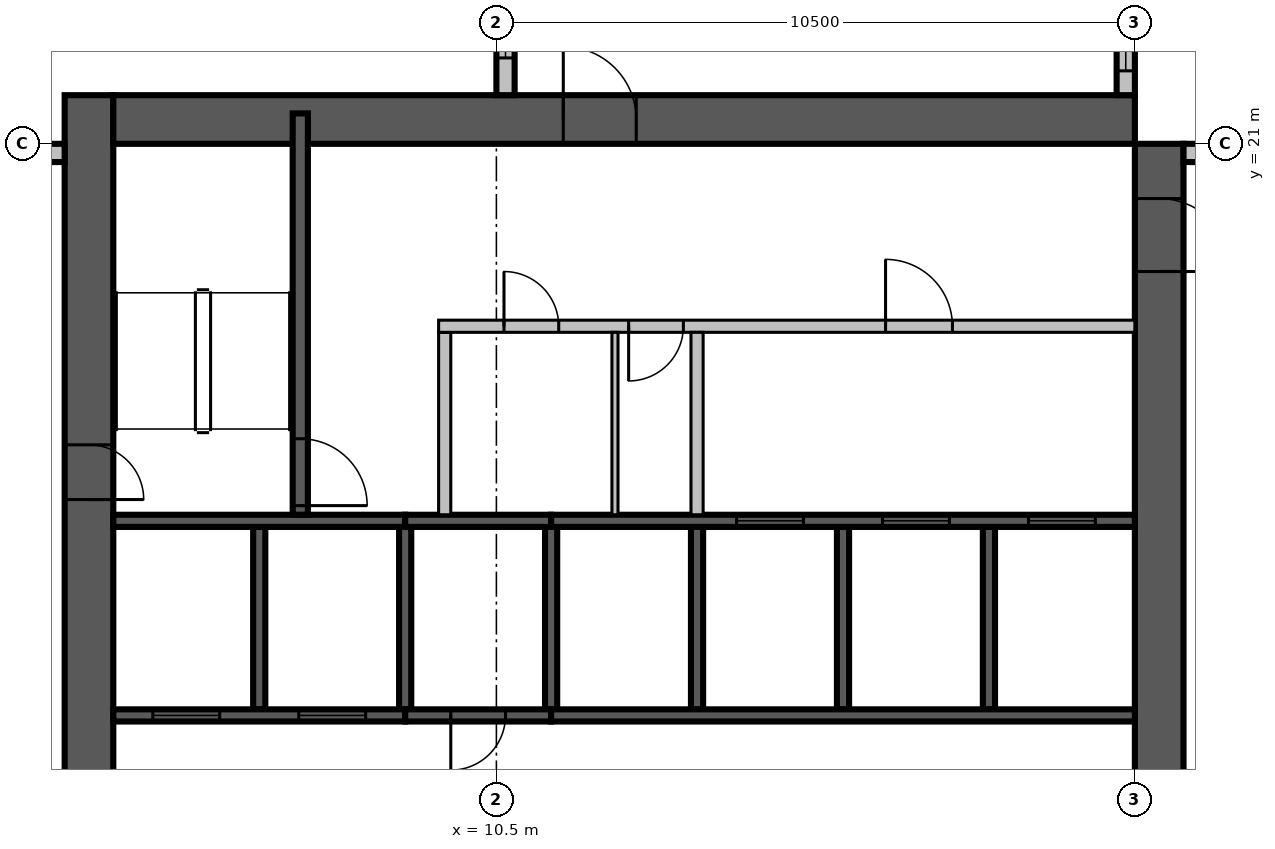
"""IFC4 building model, lengths in metres.
Left out: names, types, materials, properties, quantities, classifications, styles, units other than length and angle.
Written with IfcOpenShell. Run it as: python <this file> out.ifc"""

import sys

from ifc_helpers import new_model, si_unit, direction, frame, frame_2d, origin, place, context, subcontext, project, spatial, rectangle, extrude, source, transform, mapped, element, fill, save


model = new_model("IFC4")
c1 = context("Model", 3, precision=1e-05, world=origin(), true_north=direction((0.0, 1.0)))
c2 = subcontext(c1, "Body", "Model", "MODEL_VIEW")
j1 = project(units=[si_unit("LENGTHUNIT", "METRE"), si_unit("PLANEANGLEUNIT", "RADIAN")], contexts=[c1])
p1 = place(None, origin())
s1 = spatial("IfcSite", under=j1, at=p1, CompositionType="ELEMENT")
p2 = place(p1, origin())
s2 = spatial("IfcBuilding", under=s1, at=p2, CompositionType="ELEMENT")
p3 = place(p2, frame((0.0, 0.0, 234.8)))
s3 = spatial("IfcBuildingStorey", under=s2, at=p3, CompositionType="ELEMENT", Elevation=234.8)
m1 = source(origin(), c2, "Body", "SweptSolid", [
    extrude(rectangle(XDim=17.6, YDim=0.8, at=frame_2d((8.8, 0.0))), origin(), (0.0, 0.0, 1.0), 3.8),
])
p4 = place(p3, frame((3.8, 4.2, 0.0), z_axis=(0.0, 0.0, 1.0), x_axis=(0.0, 1.0, 0.0)))
e1 = element("IfcWall", 1, at=p4, inside=s3, PredefinedType="SHEAR", context=c2, shape_type="MappedRepresentation", body=[
    mapped(m1, transform((0.0, 0.0, 0.0), scale=1.0)),
])
m2 = source(origin(), c2, "Body", "SweptSolid", [
    extrude(rectangle(XDim=2.2, YDim=2.1, at=frame_2d((1.1, 1.05))), frame((0.0, 0.41, 0.0), z_axis=(0.0, -1.0, 0.0), x_axis=(1.0, 0.0, 0.0)), (0.0, 0.0, 1.0), 0.82),
])
p5 = place(p4, frame((4.2, 0.0, 0.0)))
e2 = element("IfcOpeningElement", 2, at=p5, cuts=e1, PredefinedType="OPENING", context=c2, shape_type="MappedRepresentation", body=[
    mapped(m2, transform((0.0, 0.0, 0.0), scale=1.0)),
])
m3 = source(origin(), c2, "Body", "SweptSolid", [
    extrude(rectangle(XDim=0.9, YDim=2.1, at=frame_2d((0.45, 1.05))), frame((0.0, 0.41, 0.0), z_axis=(0.0, -1.0, 0.0), x_axis=(1.0, 0.0, 0.0)), (0.0, 0.0, 1.0), 0.82),
])
p6 = place(p4, frame((10.95, 0.0, 0.0)))
e3 = element("IfcOpeningElement", 3, at=p6, cuts=e1, PredefinedType="OPENING", context=c2, shape_type="MappedRepresentation", body=[
    mapped(m3, transform((0.0, 0.0, 0.0), scale=1.0)),
])
m4 = source(origin(), c2, "Body", "SweptSolid", [
    extrude(rectangle(XDim=16.8, YDim=0.8, at=frame_2d((8.4, 0.0))), origin(), (0.0, 0.0, 1.0), 3.8),
])
p7 = place(p3, frame((21.4, 4.2, 0.0), z_axis=(0.0, 0.0, 1.0), x_axis=(0.0, 1.0, 0.0)))
e4 = element("IfcWall", 4, at=p7, inside=s3, PredefinedType="SHEAR", context=c2, shape_type="MappedRepresentation", body=[
    mapped(m4, transform((0.0, 0.0, 0.0), scale=1.0)),
])
p8 = place(p7, frame((4.2, 0.0, 0.0)))
e5 = element("IfcOpeningElement", 5, at=p8, cuts=e4, PredefinedType="OPENING", context=c2, shape_type="MappedRepresentation", body=[
    mapped(m2, transform((0.0, 0.0, 0.0), scale=1.0)),
])
m5 = source(origin(), c2, "Body", "SweptSolid", [
    extrude(rectangle(XDim=1.2, YDim=2.1, at=frame_2d((0.6, 1.05))), frame((0.0, 0.41, 0.0), z_axis=(0.0, -1.0, 0.0), x_axis=(1.0, 0.0, 0.0)), (0.0, 0.0, 1.0), 0.82),
])
p9 = place(p7, frame((14.7, 0.0, 0.0)))
e6 = element("IfcOpeningElement", 6, at=p9, cuts=e4, PredefinedType="OPENING", context=c2, shape_type="MappedRepresentation", body=[
    mapped(m5, transform((0.0, 0.0, 0.0), scale=1.0)),
])
p10 = place(p3, frame((4.2, 21.4, 0.0), z_axis=(0.0, 0.0, 1.0), x_axis=(1.0, 0.0, 0.0)))
e7 = element("IfcWall", 7, at=p10, inside=s3, PredefinedType="SHEAR", context=c2, shape_type="MappedRepresentation", body=[
    mapped(m4, transform((0.0, 0.0, 0.0), scale=1.0)),
])
p11 = place(p10, frame((7.4, 0.0, 0.0)))
e8 = element("IfcOpeningElement", 8, at=p11, cuts=e7, PredefinedType="OPENING", context=c2, shape_type="MappedRepresentation", body=[
    mapped(m5, transform((0.0, 0.0, 0.0), scale=1.0)),
])
m6 = source(origin(), c2, "Body", "SweptSolid", [
    extrude(rectangle(XDim=7.2, YDim=0.3, at=frame_2d((3.6, 0.0))), origin(), (0.0, 0.0, 1.0), 3.4),
])
p12 = place(p3, frame((29.0, 20.85, 0.0), z_axis=(0.0, 0.0, 1.0), x_axis=(-1.0, 0.0, 0.0)))
e9 = element("IfcWall", 9, at=p12, inside=s3, PredefinedType="STANDARD", context=c2, shape_type="MappedRepresentation", body=[
    mapped(m6, transform((0.0, 0.0, 0.0), scale=1.0)),
])
m7 = source(origin(), c2, "Body", "SweptSolid", [
    extrude(rectangle(XDim=3.0, YDim=2.3, at=frame_2d((1.5, 1.15))), frame((0.0, 0.16, 0.0), z_axis=(0.0, -1.0, 0.0), x_axis=(1.0, 0.0, 0.0)), (0.0, 0.0, 1.0), 0.32),
])
p13 = place(p12, frame((0.2, 0.0, 0.6)))
e10 = element("IfcOpeningElement", 10, at=p13, cuts=e9, PredefinedType="OPENING", context=c2, shape_type="MappedRepresentation", body=[
    mapped(m7, transform((0.0, 0.0, 0.0), scale=1.0)),
])
m8 = source(origin(), c2, "Body", "SweptSolid", [
    extrude(rectangle(XDim=1.8, YDim=2.3, at=frame_2d((0.9, 1.15))), frame((0.0, 0.16, 0.0), z_axis=(0.0, -1.0, 0.0), x_axis=(1.0, 0.0, 0.0)), (0.0, 0.0, 1.0), 0.32),
])
p14 = place(p12, frame((5.0, 0.0, 0.6)))
e11 = element("IfcOpeningElement", 11, at=p14, cuts=e9, PredefinedType="OPENING", context=c2, shape_type="MappedRepresentation", body=[
    mapped(m8, transform((0.0, 0.0, 0.0), scale=1.0)),
])
p15 = place(p3, frame((20.85, 21.8, 0.0), z_axis=(0.0, 0.0, 1.0), x_axis=(0.0, 1.0, 0.0)))
e12 = element("IfcWall", 12, at=p15, inside=s3, PredefinedType="STANDARD", context=c2, shape_type="MappedRepresentation", body=[
    mapped(m6, transform((0.0, 0.0, 0.0), scale=1.0)),
])
p16 = place(p15, frame((0.4, 0.0, 0.6)))
e13 = element("IfcOpeningElement", 13, at=p16, cuts=e12, PredefinedType="OPENING", context=c2, shape_type="MappedRepresentation", body=[
    mapped(m8, transform((0.0, 0.0, 0.0), scale=1.0)),
])
p17 = place(p15, frame((4.0, 0.0, 0.6)))
e14 = element("IfcOpeningElement", 14, at=p17, cuts=e12, PredefinedType="OPENING", context=c2, shape_type="MappedRepresentation", body=[
    mapped(m7, transform((0.0, 0.0, 0.0), scale=1.0)),
])
p18 = place(p3, frame((10.65, 29.0, 0.0), z_axis=(0.0, 0.0, 1.0), x_axis=(0.0, -1.0, 0.0)))
e15 = element("IfcWall", 15, at=p18, inside=s3, PredefinedType="STANDARD", context=c2, shape_type="MappedRepresentation", body=[
    mapped(m6, transform((0.0, 0.0, 0.0), scale=1.0)),
])
p19 = place(p18, frame((0.2, 0.0, 0.6)))
e16 = element("IfcOpeningElement", 16, at=p19, cuts=e15, PredefinedType="OPENING", context=c2, shape_type="MappedRepresentation", body=[
    mapped(m8, transform((0.0, 0.0, 0.0), scale=1.0)),
])
m9 = source(origin(), c2, "Body", "SweptSolid", [
    extrude(rectangle(XDim=2.4, YDim=2.3, at=frame_2d((1.2, 1.15))), frame((0.0, 0.16, 0.0), z_axis=(0.0, -1.0, 0.0), x_axis=(1.0, 0.0, 0.0)), (0.0, 0.0, 1.0), 0.32),
])
p20 = place(p18, frame((4.188, 0.0, 0.6)))
e17 = element("IfcOpeningElement", 17, at=p20, cuts=e15, PredefinedType="OPENING", context=c2, shape_type="MappedRepresentation", body=[
    mapped(m9, transform((0.0, 0.0, 0.0), scale=1.0)),
])
m10 = source(origin(), c2, "Body", "SweptSolid", [
    extrude(rectangle(XDim=2.6, YDim=0.3, at=frame_2d((1.3, 0.0))), origin(), (0.0, 0.0, 1.0), 3.4),
])
p21 = place(p3, frame((3.4, 20.85, 0.0), z_axis=(0.0, 0.0, 1.0), x_axis=(-1.0, 0.0, 0.0)))
e18 = element("IfcWall", 18, at=p21, inside=s3, PredefinedType="STANDARD", context=c2, shape_type="MappedRepresentation", body=[
    mapped(m10, transform((0.0, 0.0, 0.0), scale=1.0)),
])
p22 = place(p21, frame((0.4, 0.0, 0.6)))
e19 = element("IfcOpeningElement", 19, at=p22, cuts=e18, PredefinedType="OPENING", context=c2, shape_type="MappedRepresentation", body=[
    mapped(m8, transform((0.0, 0.0, 0.0), scale=1.0)),
])
m11 = source(origin(), c2, "Body", "SweptSolid", [
    extrude(rectangle(XDim=3.0, YDim=0.2, at=frame_2d((1.5, 0.0))), origin(), (0.0, 0.0, 1.0), 3.8),
])
p23 = place(p3, frame((6.6, 11.7, 0.0), z_axis=(0.0, 0.0, 1.0), x_axis=(0.0, 1.0, 0.0)))
e20 = element("IfcWall", 20, at=p23, inside=s3, PredefinedType="SOLIDWALL", context=c2, shape_type="MappedRepresentation", body=[
    mapped(m11, transform((0.0, 0.0, 0.0), scale=1.0)),
])
m12 = source(origin(), c2, "Body", "SweptSolid", [
    extrude(rectangle(XDim=3.0, YDim=0.2, at=frame_2d((1.5, 0.0))), origin(), (0.0, 0.0, 1.0), 3.4),
])
for number, where, z_axis, x_axis in (
    (21, (9.0, 11.7, 0.0), (0.0, 0.0, 1.0), (0.0, 1.0, 0.0)),
    (22, (11.4, 11.7, 0.0), (0.0, 0.0, 1.0), (0.0, 1.0, 0.0)),
):
    element("IfcWall", number, at=place(p3, frame(where, z_axis=z_axis, x_axis=x_axis)), inside=s3, PredefinedType="SOLIDWALL", context=c2, shape_type="MappedRepresentation", body=[
        mapped(m12, transform((0.0, 0.0, 0.0), scale=1.0)),
    ])
for number, where, z_axis, x_axis in (
    (23, (13.8, 11.7, 0.0), (0.0, 0.0, 1.0), (0.0, 1.0, 0.0)),
    (24, (16.2, 11.7, 0.0), (0.0, 0.0, 1.0), (0.0, 1.0, 0.0)),
    (25, (18.6, 11.7, 0.0), (0.0, 0.0, 1.0), (0.0, 1.0, 0.0)),
):
    element("IfcWall", number, at=place(p3, frame(where, z_axis=z_axis, x_axis=x_axis)), inside=s3, PredefinedType="SOLIDWALL", context=c2, shape_type="MappedRepresentation", body=[
        mapped(m11, transform((0.0, 0.0, 0.0), scale=1.0)),
    ])
m13 = source(origin(), c2, "Body", "SweptSolid", [
    extrude(rectangle(XDim=4.8, YDim=0.2, at=frame_2d((2.4, 0.0))), origin(), (0.0, 0.0, 1.0), 3.8),
])
p24 = place(p3, frame((4.2, 11.6, 0.0), z_axis=(0.0, 0.0, 1.0), x_axis=(1.0, 0.0, 0.0)))
e26 = element("IfcWall", 26, at=p24, inside=s3, PredefinedType="SOLIDWALL", context=c2, shape_type="MappedRepresentation", body=[
    mapped(m13, transform((0.0, 0.0, 0.0), scale=1.0)),
])
m14 = source(origin(), c2, "Body", "SweptSolid", [
    extrude(rectangle(XDim=1.1, YDim=2.1, at=frame_2d((0.55, 1.05))), frame((0.0, 0.11, 0.0), z_axis=(0.0, -1.0, 0.0), x_axis=(1.0, 0.0, 0.0)), (0.0, 0.0, 1.0), 0.22),
])
p25 = place(p24, frame((0.65, 0.0, 0.0)))
e27 = element("IfcOpeningElement", 27, at=p25, cuts=e26, PredefinedType="OPENING", context=c2, shape_type="MappedRepresentation", body=[
    mapped(m14, transform((0.0, 0.0, 0.0), scale=1.0)),
])
p26 = place(p24, frame((3.05, 0.0, 0.0)))
e28 = element("IfcOpeningElement", 28, at=p26, cuts=e26, PredefinedType="OPENING", context=c2, shape_type="MappedRepresentation", body=[
    mapped(m14, transform((0.0, 0.0, 0.0), scale=1.0)),
])
m15 = source(origin(), c2, "Body", "SweptSolid", [
    extrude(rectangle(XDim=2.4, YDim=0.2, at=frame_2d((1.2, 0.0))), origin(), (0.0, 0.0, 1.0), 3.4),
])
p27 = place(p3, frame((9.0, 11.6, 0.0), z_axis=(0.0, 0.0, 1.0), x_axis=(1.0, 0.0, 0.0)))
e29 = element("IfcWall", 29, at=p27, inside=s3, PredefinedType="SOLIDWALL", context=c2, shape_type="MappedRepresentation", body=[
    mapped(m15, transform((0.0, 0.0, 0.0), scale=1.0)),
])
m16 = source(origin(), c2, "Body", "SweptSolid", [
    extrude(rectangle(XDim=0.9, YDim=2.1, at=frame_2d((0.45, 1.05))), frame((0.0, 0.11, 0.0), z_axis=(0.0, -1.0, 0.0), x_axis=(1.0, 0.0, 0.0)), (0.0, 0.0, 1.0), 0.22),
])
p28 = place(p27, frame((0.75, 0.0, 0.0)))
e30 = element("IfcOpeningElement", 30, at=p28, cuts=e29, PredefinedType="OPENING", context=c2, shape_type="MappedRepresentation", body=[
    mapped(m16, transform((0.0, 0.0, 0.0), scale=1.0)),
])
m17 = source(origin(), c2, "Body", "SweptSolid", [
    extrude(rectangle(XDim=9.6, YDim=0.2, at=frame_2d((4.8, 0.0))), origin(), (0.0, 0.0, 1.0), 3.8),
])
p29 = place(p3, frame((11.4, 11.6, 0.0), z_axis=(0.0, 0.0, 1.0), x_axis=(1.0, 0.0, 0.0)))
e31 = element("IfcWall", 31, at=p29, inside=s3, PredefinedType="SOLIDWALL", context=c2, shape_type="MappedRepresentation", body=[
    mapped(m17, transform((0.0, 0.0, 0.0), scale=1.0)),
])
p30 = place(p3, frame((4.2, 14.8, 0.0), z_axis=(0.0, 0.0, 1.0), x_axis=(1.0, 0.0, 0.0)))
e32 = element("IfcWall", 32, at=p30, inside=s3, PredefinedType="SOLIDWALL", context=c2, shape_type="MappedRepresentation", body=[
    mapped(m13, transform((0.0, 0.0, 0.0), scale=1.0)),
])
p31 = place(p3, frame((9.0, 14.8, 0.0), z_axis=(0.0, 0.0, 1.0), x_axis=(1.0, 0.0, 0.0)))
e33 = element("IfcWall", 33, at=p31, inside=s3, PredefinedType="SOLIDWALL", context=c2, shape_type="MappedRepresentation", body=[
    mapped(m15, transform((0.0, 0.0, 0.0), scale=1.0)),
])
p32 = place(p3, frame((11.4, 14.8, 0.0), z_axis=(0.0, 0.0, 1.0), x_axis=(1.0, 0.0, 0.0)))
e34 = element("IfcWall", 34, at=p32, inside=s3, PredefinedType="SOLIDWALL", context=c2, shape_type="MappedRepresentation", body=[
    mapped(m17, transform((0.0, 0.0, 0.0), scale=1.0)),
])
p33 = place(p32, frame((3.05, 0.0, 0.0)))
e35 = element("IfcOpeningElement", 35, at=p33, cuts=e34, PredefinedType="OPENING", context=c2, shape_type="MappedRepresentation", body=[
    mapped(m14, transform((0.0, 0.0, 0.0), scale=1.0)),
])
p34 = place(p32, frame((5.45, 0.0, 0.0)))
e36 = element("IfcOpeningElement", 36, at=p34, cuts=e34, PredefinedType="OPENING", context=c2, shape_type="MappedRepresentation", body=[
    mapped(m14, transform((0.0, 0.0, 0.0), scale=1.0)),
])
p35 = place(p32, frame((7.85, 0.0, 0.0)))
e37 = element("IfcOpeningElement", 37, at=p35, cuts=e34, PredefinedType="OPENING", context=c2, shape_type="MappedRepresentation", body=[
    mapped(m14, transform((0.0, 0.0, 0.0), scale=1.0)),
])
m18 = source(origin(), c2, "Body", "SweptSolid", [
    extrude(rectangle(XDim=6.6, YDim=0.25, at=frame_2d((3.3, 0.0))), origin(), (0.0, 0.0, 1.0), 3.4),
])
p36 = place(p3, frame((7.275, 14.9, 0.0), z_axis=(0.0, 0.0, 1.0), x_axis=(0.0, 1.0, 0.0)))
e38 = element("IfcWall", 38, at=p36, inside=s3, PredefinedType="SOLIDWALL", context=c2, shape_type="MappedRepresentation", body=[
    mapped(m18, transform((0.0, 0.0, 0.0), scale=1.0)),
])
m19 = source(origin(), c2, "Body", "SweptSolid", [
    extrude(rectangle(XDim=1.1, YDim=2.1, at=frame_2d((0.55, 1.05))), frame((0.0, 0.135, 0.0), z_axis=(0.0, -1.0, 0.0), x_axis=(1.0, 0.0, 0.0)), (0.0, 0.0, 1.0), 0.27),
])
p37 = place(p36, frame((0.15, 0.0, 0.0)))
e39 = element("IfcOpeningElement", 39, at=p37, cuts=e38, PredefinedType="OPENING", context=c2, shape_type="MappedRepresentation", body=[
    mapped(m19, transform((0.0, 0.0, 0.0), scale=1.0)),
])
m20 = source(origin(), c2, "Body", "SweptSolid", [
    extrude(rectangle(XDim=3.0, YDim=0.2, at=frame_2d((1.5, 0.0))), origin(), (0.0, 0.0, 1.0), 3.4),
])
p38 = place(p3, frame((9.65, 14.9, 0.0), z_axis=(0.0, 0.0, 1.0), x_axis=(0.0, 1.0, 0.0)))
e40 = element("IfcWall", 40, at=p38, inside=s3, PredefinedType="PARTITIONING", context=c2, shape_type="MappedRepresentation", body=[
    mapped(m20, transform((0.0, 0.0, 0.0), scale=1.0)),
])
m21 = source(origin(), c2, "Body", "SweptSolid", [
    extrude(rectangle(XDim=11.45, YDim=0.2, at=frame_2d((5.725, 0.0))), origin(), (0.0, 0.0, 1.0), 3.4),
])
p39 = place(p3, frame((9.55, 18.0, 0.0), z_axis=(0.0, 0.0, 1.0), x_axis=(1.0, 0.0, 0.0)))
e41 = element("IfcWall", 41, at=p39, inside=s3, PredefinedType="PARTITIONING", context=c2, shape_type="MappedRepresentation", body=[
    mapped(m21, transform((0.0, 0.0, 0.0), scale=1.0)),
])
p40 = place(p39, frame((1.075, 0.0, 0.0)))
e42 = element("IfcOpeningElement", 42, at=p40, cuts=e41, PredefinedType="OPENING", context=c2, shape_type="MappedRepresentation", body=[
    mapped(m16, transform((0.0, 0.0, 0.0), scale=1.0)),
])
p41 = place(p39, frame((3.125, 0.0, 0.0)))
e43 = element("IfcOpeningElement", 43, at=p41, cuts=e41, PredefinedType="OPENING", context=c2, shape_type="MappedRepresentation", body=[
    mapped(m16, transform((0.0, 0.0, 0.0), scale=1.0)),
])
p42 = place(p39, frame((7.35, 0.0, 0.0)))
e44 = element("IfcOpeningElement", 44, at=p42, cuts=e41, PredefinedType="OPENING", context=c2, shape_type="MappedRepresentation", body=[
    mapped(m14, transform((0.0, 0.0, 0.0), scale=1.0)),
])
p43 = place(p3, frame((13.8, 14.9, 0.0), z_axis=(0.0, 0.0, 1.0), x_axis=(0.0, 1.0, 0.0)))
e45 = element("IfcWall", 45, at=p43, inside=s3, PredefinedType="PARTITIONING", context=c2, shape_type="MappedRepresentation", body=[
    mapped(m20, transform((0.0, 0.0, 0.0), scale=1.0)),
])
m22 = source(origin(), c2, "Body", "SweptSolid", [
    extrude(rectangle(XDim=3.0, YDim=0.1, at=frame_2d((1.5, 0.0))), origin(), (0.0, 0.0, 1.0), 3.4),
])
p44 = place(p3, frame((12.45, 14.9, 0.0), z_axis=(0.0, 0.0, 1.0), x_axis=(0.0, 1.0, 0.0)))
e46 = element("IfcWall", 46, at=p44, inside=s3, PredefinedType="PARTITIONING", context=c2, shape_type="MappedRepresentation", body=[
    mapped(m22, transform((0.0, 0.0, 0.0), scale=1.0)),
])
m23 = source(origin(), c2, "Body", "SweptSolid", [
    extrude(rectangle(XDim=1.8, YDim=2.3, at=frame_2d((0.9, 1.15))), frame((0.0, 0.03, 0.0), z_axis=(0.0, -1.0, 0.0), x_axis=(1.0, 0.0, 0.0)), (0.0, 0.0, 1.0), 0.06),
])
p45 = place(p16, origin())
e47 = element("IfcWindow", 47, at=p45, inside=s3, PartitioningType="SINGLE_PANEL", PredefinedType="WINDOW", context=c2, shape_type="MappedRepresentation", body=[
    mapped(m23, transform((0.0, 0.0, 0.0), scale=1.0)),
])
fill(e13, e47)
m24 = source(origin(), c2, "Body", "SweptSolid", [
    extrude(rectangle(XDim=2.4, YDim=2.3, at=frame_2d((1.2, 1.15))), frame((0.0, 0.03, 0.0), z_axis=(0.0, -1.0, 0.0), x_axis=(1.0, 0.0, 0.0)), (0.0, 0.0, 1.0), 0.06),
])
p46 = place(p20, origin())
e48 = element("IfcWindow", 48, at=p46, inside=s3, PartitioningType="SINGLE_PANEL", PredefinedType="WINDOW", context=c2, shape_type="MappedRepresentation", body=[
    mapped(m24, transform((0.0, 0.0, 0.0), scale=1.0)),
])
fill(e17, e48)
m25 = source(origin(), c2, "Body", "SweptSolid", [
    extrude(rectangle(XDim=1.1, YDim=2.1, at=frame_2d((0.55, 1.05))), frame((0.0, 0.025, 0.0), z_axis=(0.0, -1.0, 0.0), x_axis=(1.0, 0.0, 0.0)), (0.0, 0.0, 1.0), 0.05),
])
p47 = place(p25, origin())
e49 = element("IfcDoor", 49, at=p47, inside=s3, OperationType="SLIDING_TO_LEFT", PredefinedType="DOOR", context=c2, shape_type="MappedRepresentation", body=[
    mapped(m25, transform((0.0, 0.0, 0.0), scale=1.0)),
])
fill(e27, e49)
p48 = place(p26, origin())
e50 = element("IfcDoor", 50, at=p48, inside=s3, OperationType="SLIDING_TO_LEFT", PredefinedType="DOOR", context=c2, shape_type="MappedRepresentation", body=[
    mapped(m25, transform((0.0, 0.0, 0.0), scale=1.0)),
])
fill(e28, e50)
m26 = source(origin(), c2, "Body", "SweptSolid", [
    extrude(rectangle(XDim=0.9, YDim=2.1, at=frame_2d((0.45, 1.05))), frame((0.0, 0.025, 0.0), z_axis=(0.0, -1.0, 0.0), x_axis=(1.0, 0.0, 0.0)), (0.0, 0.0, 1.0), 0.05),
])
p49 = place(p28, origin())
e51 = element("IfcDoor", 51, at=p49, inside=s3, OperationType="SINGLE_SWING_RIGHT", PredefinedType="DOOR", context=c2, shape_type="MappedRepresentation", body=[
    mapped(m26, transform((0.0, 0.0, 0.0), scale=1.0)),
])
fill(e30, e51)
p50 = place(p33, origin())
e52 = element("IfcDoor", 52, at=p50, inside=s3, OperationType="SLIDING_TO_LEFT", PredefinedType="DOOR", context=c2, shape_type="MappedRepresentation", body=[
    mapped(m25, transform((0.0, 0.0, 0.0), scale=1.0)),
])
fill(e35, e52)
p51 = place(p34, origin())
e53 = element("IfcDoor", 53, at=p51, inside=s3, OperationType="SLIDING_TO_LEFT", PredefinedType="DOOR", context=c2, shape_type="MappedRepresentation", body=[
    mapped(m25, transform((0.0, 0.0, 0.0), scale=1.0)),
])
fill(e36, e53)
p52 = place(p35, origin())
e54 = element("IfcDoor", 54, at=p52, inside=s3, OperationType="SLIDING_TO_LEFT", PredefinedType="DOOR", context=c2, shape_type="MappedRepresentation", body=[
    mapped(m25, transform((0.0, 0.0, 0.0), scale=1.0)),
])
fill(e37, e54)
p53 = place(p37, origin())
e55 = element("IfcDoor", 55, at=p53, inside=s3, OperationType="SINGLE_SWING_RIGHT", PredefinedType="DOOR", context=c2, shape_type="MappedRepresentation", body=[
    mapped(m25, transform((0.0, 0.0, 0.0), scale=1.0)),
])
fill(e39, e55)
p54 = place(p40, origin())
e56 = element("IfcDoor", 56, at=p54, inside=s3, OperationType="SINGLE_SWING_LEFT", PredefinedType="DOOR", context=c2, shape_type="MappedRepresentation", body=[
    mapped(m26, transform((0.0, 0.0, 0.0), scale=1.0)),
])
fill(e42, e56)
p55 = place(p41, origin())
e57 = element("IfcDoor", 57, at=p55, inside=s3, OperationType="SINGLE_SWING_RIGHT", PredefinedType="DOOR", context=c2, shape_type="MappedRepresentation", body=[
    mapped(m26, transform((0.0, 0.0, 0.0), scale=1.0)),
])
fill(e43, e57)
p56 = place(p42, origin())
e58 = element("IfcDoor", 58, at=p56, inside=s3, OperationType="SINGLE_SWING_LEFT", PredefinedType="DOOR", context=c2, shape_type="MappedRepresentation", body=[
    mapped(m25, transform((0.0, 0.0, 0.0), scale=1.0)),
])
fill(e44, e58)
m27 = source(origin(), c2, "Body", "SweptSolid", [
    extrude(rectangle(XDim=1.2, YDim=2.1, at=frame_2d((0.6, 1.05))), frame((0.0, 0.025, 0.0), z_axis=(0.0, -1.0, 0.0), x_axis=(1.0, 0.0, 0.0)), (0.0, 0.0, 1.0), 0.05),
])
p57 = place(p11, origin())
e59 = element("IfcDoor", 59, at=p57, inside=s3, OperationType="SINGLE_SWING_LEFT", PredefinedType="DOOR", context=c2, shape_type="MappedRepresentation", body=[
    mapped(m27, transform((0.0, 0.0, 0.0), scale=1.0)),
])
fill(e8, e59)
p58 = place(p9, origin())
e60 = element("IfcDoor", 60, at=p58, inside=s3, OperationType="SINGLE_SWING_RIGHT", PredefinedType="DOOR", context=c2, shape_type="MappedRepresentation", body=[
    mapped(m27, transform((0.0, 0.0, 0.0), scale=1.0)),
])
fill(e6, e60)
p59 = place(p6, origin())
e61 = element("IfcDoor", 61, at=p59, inside=s3, OperationType="SINGLE_SWING_RIGHT", PredefinedType="DOOR", context=c2, shape_type="MappedRepresentation", body=[
    mapped(m26, transform((0.0, 0.0, 0.0), scale=1.0)),
])
fill(e3, e61)
save(model, sys.argv[1])
